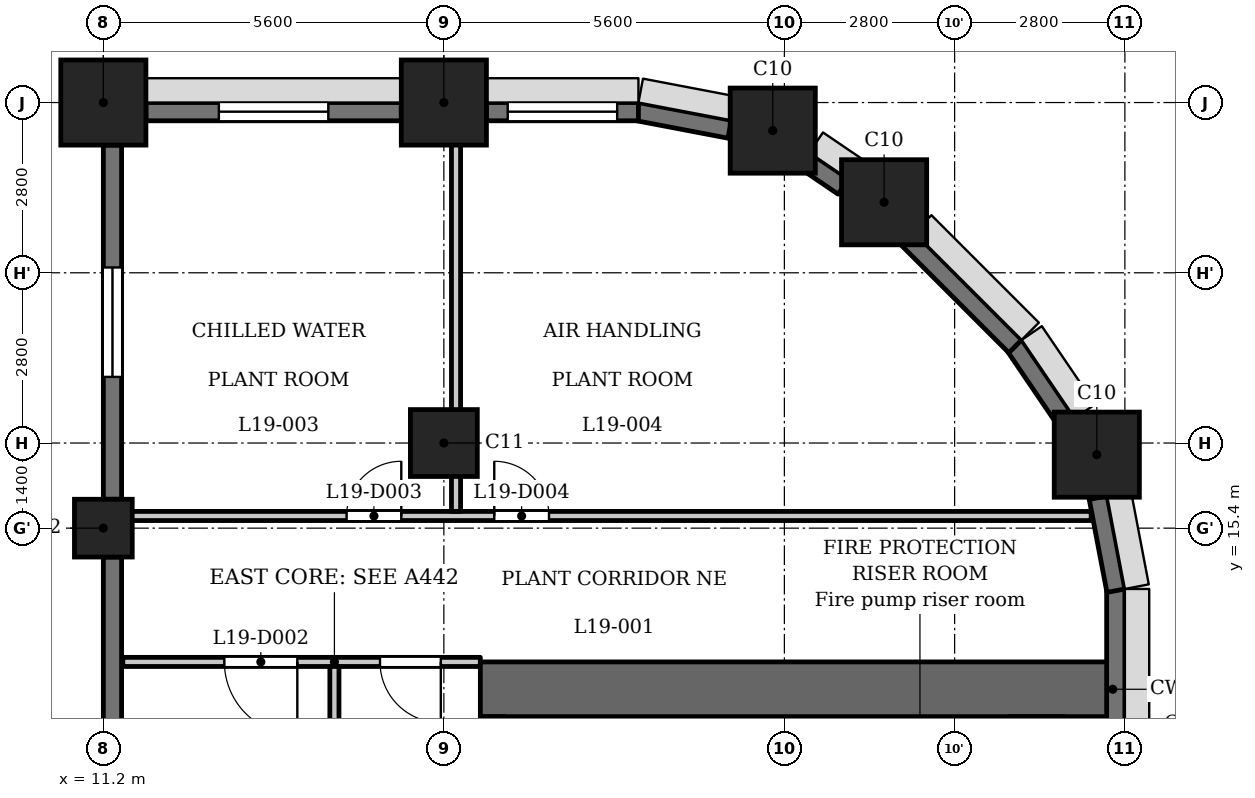
"""IFC4 building model, lengths in metres.
Left out: names, types, materials, properties, quantities, classifications, styles, units other than length and angle.
Written with IfcOpenShell. Run it as: python <this file> out.ifc"""

import sys

from ifc_helpers import new_model, si_unit, direction, frame, frame_2d, origin, origin_2d, place, context, subcontext, project, spatial, rectangle, extrude, element, fill, save


model = new_model("IFC4")
c1 = context("Model", 3, precision=1e-05, world=origin(), true_north=direction((0.0, 1.0)))
c2 = subcontext(c1, "Body", "Model", "MODEL_VIEW")
j1 = project(units=[si_unit("LENGTHUNIT", "METRE"), si_unit("PLANEANGLEUNIT", "RADIAN")], contexts=[c1])
p1 = place(None, origin())
s1 = spatial("IfcSite", under=j1, at=p1, CompositionType="ELEMENT")
p2 = place(p1, origin())
s2 = spatial("IfcBuilding", under=s1, at=p2, CompositionType="ELEMENT")
p3 = place(p2, frame((0.0, 0.0, 77.9)))
s3 = spatial("IfcBuildingStorey", under=s2, at=p3, CompositionType="ELEMENT", Elevation=77.9)
for number, where, z_axis, x_axis in (
    (1, (27.538, 16.609, 0.0), (0.0, 0.0, 1.0), (1.0, 0.0, 0.0)),
    (2, (24.04, 20.76, 0.0), (0.0, 0.0, 1.0), (1.0, 0.0, 0.0)),
    (3, (22.209, 21.938, 0.0), (0.0, 0.0, 1.0), (1.0, 0.0, 0.0)),
    (4, (16.8, 22.4, 0.0), (0.0, 0.0, 1.0), (1.0, 0.0, 0.0)),
    (5, (11.2, 22.4, 0.0), (0.0, 0.0, 1.0), (1.0, 0.0, 0.0)),
):
    element("IfcColumn", number, at=place(p3, frame(where, z_axis=z_axis, x_axis=x_axis)), inside=s3, PredefinedType="COLUMN", context=c2, shape_type="SweptSolid", body=[
        extrude(rectangle(XDim=1.4, YDim=1.4, at=origin_2d()), origin(), (0.0, 0.0, 1.0), 5.4),
    ])
p4 = place(p3, frame((16.8, 16.8, 0.0), z_axis=(0.0, 0.0, 1.0), x_axis=(1.0, 0.0, 0.0)))
e6 = element("IfcColumn", 6, at=p4, inside=s3, PredefinedType="COLUMN", context=c2, shape_type="SweptSolid", body=[
    extrude(rectangle(XDim=1.1, YDim=1.1, at=origin_2d()), origin(), (0.0, 0.0, 1.0), 5.4),
])
p5 = place(p3, frame((11.2, 15.4, 0.0), z_axis=(0.0, 0.0, 1.0), x_axis=(1.0, 0.0, 0.0)))
e7 = element("IfcColumn", 7, at=p5, inside=s3, PredefinedType="COLUMN", context=c2, shape_type="SweptSolid", body=[
    extrude(rectangle(XDim=0.95, YDim=0.95, at=origin_2d()), origin(), (0.0, 0.0, 1.0), 5.4),
])
p6 = place(p3, frame((27.85, 11.9, 0.0), z_axis=(0.0, 0.0, 1.0), x_axis=(0.0, 1.0, 0.0)))
e8 = element("IfcWall", 8, at=p6, inside=s3, PredefinedType="SOLIDWALL", context=c2, shape_type="SweptSolid", body=[
    extrude(rectangle(XDim=2.5, YDim=0.3, at=frame_2d((1.25, 0.0))), origin(), (0.0, 0.0, 1.0), 4.25),
])
for number, where, z_axis, x_axis in (
    (9, (27.853, 14.372, 0.0), (0.0, 0.0, 1.0), (-0.187, 0.982, 0.0)),
    (10, (27.053, 17.126, 0.0), (0.0, 0.0, 1.0), (-0.562, 0.827, 0.0)),
):
    element("IfcWall", number, at=place(p3, frame(where, z_axis=z_axis, x_axis=x_axis)), inside=s3, PredefinedType="SOLIDWALL", context=c2, shape_type="SweptSolid", body=[
        extrude(rectangle(XDim=1.556, YDim=0.3, at=frame_2d((0.778, 0.0))), origin(), (0.0, 0.0, 1.0), 4.25),
    ])
p7 = place(p3, frame((26.197, 18.391, 0.0), z_axis=(0.0, 0.0, 1.0), x_axis=(-0.707057949532, 0.707155609469, 0.0)))
e11 = element("IfcWall", 11, at=p7, inside=s3, PredefinedType="SOLIDWALL", context=c2, shape_type="SweptSolid", body=[
    extrude(rectangle(XDim=2.5, YDim=0.3, at=frame_2d((1.25, 0.0))), origin(), (0.0, 0.0, 1.0), 4.25),
])
p8 = place(p3, frame((23.368, 21.017, 0.0), z_axis=(0.0, 0.0, 1.0), x_axis=(-0.827037530089, 0.562146710232, 0.0)))
e12 = element("IfcWall", 12, at=p8, inside=s3, PredefinedType="SOLIDWALL", context=c2, shape_type="SweptSolid", body=[
    extrude(rectangle(XDim=0.777, YDim=0.3, at=frame_2d((0.388, 0.0))), origin(), (0.0, 0.0, 1.0), 5.1),
])
p9 = place(p3, frame((21.5, 21.961, 0.0), z_axis=(0.0, 0.0, 1.0), x_axis=(-0.982297345734, 0.187328386968, 0.0)))
e13 = element("IfcWall", 13, at=p9, inside=s3, PredefinedType="SOLIDWALL", context=c2, shape_type="SweptSolid", body=[
    extrude(rectangle(XDim=1.556, YDim=0.3, at=frame_2d((0.778, 0.0))), origin(), (0.0, 0.0, 1.0), 4.25),
])
p10 = place(p3, frame((20.0, 22.25, 0.0), z_axis=(0.0, 0.0, 1.0), x_axis=(-1.0, 0.0, 0.0)))
e14 = element("IfcWall", 14, at=p10, inside=s3, PredefinedType="SOLIDWALL", context=c2, shape_type="SweptSolid", body=[
    extrude(rectangle(XDim=2.5, YDim=0.3, at=frame_2d((1.25, 0.0))), origin(), (0.0, 0.0, 1.0), 4.25),
])
p11 = place(p10, frame((0.35, 0.0, 0.9)))
e15 = element("IfcOpeningElement", 15, at=p11, cuts=e14, PredefinedType="OPENING", context=c2, shape_type="SweptSolid", body=[
    extrude(rectangle(XDim=1.8, YDim=1.5, at=frame_2d((0.9, 0.75))), frame((0.0, 0.16, 0.0), z_axis=(0.0, -1.0, 0.0), x_axis=(1.0, 0.0, 0.0)), (0.0, 0.0, 1.0), 0.32),
])
p12 = place(p3, frame((16.1, 22.25, 0.0), z_axis=(0.0, 0.0, 1.0), x_axis=(-1.0, 0.0, 0.0)))
e16 = element("IfcWall", 16, at=p12, inside=s3, PredefinedType="SOLIDWALL", context=c2, shape_type="SweptSolid", body=[
    extrude(rectangle(XDim=4.2, YDim=0.3, at=frame_2d((2.1, 0.0))), origin(), (0.0, 0.0, 1.0), 4.25),
])
p13 = place(p12, frame((1.2, 0.0, 0.9)))
e17 = element("IfcOpeningElement", 17, at=p13, cuts=e16, PredefinedType="OPENING", context=c2, shape_type="SweptSolid", body=[
    extrude(rectangle(XDim=1.8, YDim=1.5, at=frame_2d((0.9, 0.75))), frame((0.0, 0.16, 0.0), z_axis=(0.0, -1.0, 0.0), x_axis=(1.0, 0.0, 0.0)), (0.0, 0.0, 1.0), 0.32),
])
p14 = place(p3, frame((11.35, 21.7, 0.0), z_axis=(0.0, 0.0, 1.0), x_axis=(0.0, -1.0, 0.0)))
e18 = element("IfcWall", 18, at=p14, inside=s3, PredefinedType="SOLIDWALL", context=c2, shape_type="SweptSolid", body=[
    extrude(rectangle(XDim=5.825, YDim=0.3, at=frame_2d((2.913, 0.0))), origin(), (0.0, 0.0, 1.0), 5.1),
])
p15 = place(p14, frame((2.012, 0.0, 0.9)))
e19 = element("IfcOpeningElement", 19, at=p15, cuts=e18, PredefinedType="OPENING", context=c2, shape_type="SweptSolid", body=[
    extrude(rectangle(XDim=1.8, YDim=1.5, at=frame_2d((0.9, 0.75))), frame((0.0, 0.16, 0.0), z_axis=(0.0, -1.0, 0.0), x_axis=(1.0, 0.0, 0.0)), (0.0, 0.0, 1.0), 0.32),
])
p16 = place(p3, frame((11.35, 14.925, 0.0), z_axis=(0.0, 0.0, 1.0), x_axis=(0.0, -1.0, 0.0)))
e20 = element("IfcWall", 20, at=p16, inside=s3, PredefinedType="SOLIDWALL", context=c2, shape_type="SweptSolid", body=[
    extrude(rectangle(XDim=5.975, YDim=0.3, at=frame_2d((2.988, 0.0))), origin(), (0.0, 0.0, 1.0), 5.1),
])
p17 = place(p16, frame((2.988, 0.0, 0.9)))
e21 = element("IfcOpeningElement", 21, at=p17, cuts=e20, PredefinedType="OPENING", context=c2, shape_type="SweptSolid", body=[
    extrude(rectangle(XDim=1.8, YDim=1.5, at=frame_2d((0.9, 0.75))), frame((0.0, 0.16, 0.0), z_axis=(0.0, -1.0, 0.0), x_axis=(1.0, 0.0, 0.0)), (0.0, 0.0, 1.0), 0.32),
])
p18 = place(p3, frame((17.4, 12.75, 0.0), z_axis=(0.0, 0.0, 1.0), x_axis=(1.0, 0.0, 0.0)))
e22 = element("IfcWall", 22, at=p18, inside=s3, PredefinedType="SHEAR", context=c2, shape_type="SweptSolid", body=[
    extrude(rectangle(XDim=10.4, YDim=0.9, at=frame_2d((5.2, 0.0))), origin(), (0.0, 0.0, 1.0), 5.1),
])
p19 = place(p3, frame((17.6, -12.3, 0.0), z_axis=(0.0, 0.0, 1.0), x_axis=(0.0, 1.0, 0.0)))
e23 = element("IfcWall", 23, at=p19, inside=s3, PredefinedType="SHEAR", context=c2, shape_type="SweptSolid", body=[
    extrude(rectangle(XDim=24.6, YDim=0.4, at=frame_2d((12.3, 0.0))), origin(), (0.0, 0.0, 1.0), 5.1),
])
p20 = place(p19, frame((6.0, 0.0, 0.0)))
e24 = element("IfcOpeningElement", 24, at=p20, cuts=e23, PredefinedType="OPENING", context=c2, shape_type="SweptSolid", body=[
    extrude(rectangle(XDim=1.1, YDim=2.1, at=frame_2d((0.55, 1.05))), frame((0.0, 0.21, 0.0), z_axis=(0.0, -1.0, 0.0), x_axis=(1.0, 0.0, 0.0)), (0.0, 0.0, 1.0), 0.42),
])
p21 = place(p19, frame((8.4, 0.0, 0.0)))
e25 = element("IfcOpeningElement", 25, at=p21, cuts=e23, PredefinedType="OPENING", context=c2, shape_type="SweptSolid", body=[
    extrude(rectangle(XDim=1.1, YDim=2.1, at=frame_2d((0.55, 1.05))), frame((0.0, 0.21, 0.0), z_axis=(0.0, -1.0, 0.0), x_axis=(1.0, 0.0, 0.0)), (0.0, 0.0, 1.0), 0.42),
])
p22 = place(p19, frame((10.8, 0.0, 0.0)))
e26 = element("IfcOpeningElement", 26, at=p22, cuts=e23, PredefinedType="OPENING", context=c2, shape_type="SweptSolid", body=[
    extrude(rectangle(XDim=1.1, YDim=2.1, at=frame_2d((0.55, 1.05))), frame((0.0, 0.21, 0.0), z_axis=(0.0, -1.0, 0.0), x_axis=(1.0, 0.0, 0.0)), (0.0, 0.0, 1.0), 0.42),
])
p23 = place(p19, frame((16.75, 0.0, 0.0)))
e27 = element("IfcOpeningElement", 27, at=p23, cuts=e23, PredefinedType="OPENING", context=c2, shape_type="SweptSolid", body=[
    extrude(rectangle(XDim=0.9, YDim=2.1, at=frame_2d((0.45, 1.05))), frame((0.0, 0.21, 0.0), z_axis=(0.0, -1.0, 0.0), x_axis=(1.0, 0.0, 0.0)), (0.0, 0.0, 1.0), 0.42),
])
p24 = place(p19, frame((22.8, 0.0, 0.0)))
e28 = element("IfcOpeningElement", 28, at=p24, cuts=e23, PredefinedType="OPENING", context=c2, shape_type="SweptSolid", body=[
    extrude(rectangle(XDim=1.1, YDim=2.1, at=frame_2d((0.55, 1.05))), frame((0.0, 0.21, 0.0), z_axis=(0.0, -1.0, 0.0), x_axis=(1.0, 0.0, 0.0)), (0.0, 0.0, 1.0), 0.42),
])
p25 = place(p19, frame((0.7, 0.0, 0.0)))
e29 = element("IfcOpeningElement", 29, at=p25, cuts=e23, PredefinedType="OPENING", context=c2, shape_type="SweptSolid", body=[
    extrude(rectangle(XDim=1.1, YDim=2.1, at=frame_2d((0.55, 1.05))), frame((0.0, 0.21, 0.0), z_axis=(0.0, -1.0, 0.0), x_axis=(1.0, 0.0, 0.0)), (0.0, 0.0, 1.0), 0.42),
])
p26 = place(p19, frame((12.775, 0.0, 0.0)))
e30 = element("IfcOpeningElement", 30, at=p26, cuts=e23, PredefinedType="OPENING", context=c2, shape_type="SweptSolid", body=[
    extrude(rectangle(XDim=1.8, YDim=2.1, at=frame_2d((0.9, 1.05))), frame((0.0, 0.21, 0.0), z_axis=(0.0, -1.0, 0.0), x_axis=(1.0, 0.0, 0.0)), (0.0, 0.0, 1.0), 0.42),
])
p27 = place(p3, frame((26.55, -12.3, 0.0), z_axis=(0.0, 0.0, 1.0), x_axis=(0.0, 1.0, 0.0)))
e31 = element("IfcWall", 31, at=p27, inside=s3, PredefinedType="SHEAR", context=c2, shape_type="SweptSolid", body=[
    extrude(rectangle(XDim=24.6, YDim=0.9, at=frame_2d((12.3, 0.0))), origin(), (0.0, 0.0, 1.0), 5.1),
])
p28 = place(p3, frame((23.55, 9.8, 0.0), z_axis=(0.0, 0.0, 1.0), x_axis=(0.0, 1.0, 0.0)))
e32 = element("IfcWall", 32, at=p28, inside=s3, PredefinedType="PARTITIONING", context=c2, shape_type="SweptSolid", body=[
    extrude(rectangle(XDim=2.5, YDim=0.2, at=frame_2d((1.25, 0.0))), origin(), (0.0, 0.0, 1.0), 5.1),
])
p29 = place(p28, frame((0.8, 0.0, 0.0)))
e33 = element("IfcOpeningElement", 33, at=p29, cuts=e32, PredefinedType="OPENING", context=c2, shape_type="SweptSolid", body=[
    extrude(rectangle(XDim=0.9, YDim=2.1, at=frame_2d((0.45, 1.05))), frame((0.0, 0.11, 0.0), z_axis=(0.0, -1.0, 0.0), x_axis=(1.0, 0.0, 0.0)), (0.0, 0.0, 1.0), 0.22),
])
p30 = place(p3, frame((11.52, 13.2, 0.0), z_axis=(0.0, 0.0, 1.0), x_axis=(1.0, 0.0, 0.0)))
e34 = element("IfcWall", 34, at=p30, inside=s3, PredefinedType="PARTITIONING", context=c2, shape_type="SweptSolid", body=[
    extrude(rectangle(XDim=5.88, YDim=0.15, at=frame_2d((2.94, 0.0))), origin(), (0.0, 0.0, 1.0), 5.1),
])
p31 = place(p30, frame((4.23, 0.0, 0.0)))
e35 = element("IfcOpeningElement", 35, at=p31, cuts=e34, PredefinedType="OPENING", context=c2, shape_type="SweptSolid", body=[
    extrude(rectangle(XDim=1.0, YDim=2.1, at=frame_2d((0.5, 1.05))), frame((0.0, 0.085, 0.0), z_axis=(0.0, -1.0, 0.0), x_axis=(1.0, 0.0, 0.0)), (0.0, 0.0, 1.0), 0.17),
])
p32 = place(p30, frame((1.67, 0.0, 0.0)))
e36 = element("IfcOpeningElement", 36, at=p32, cuts=e34, PredefinedType="OPENING", context=c2, shape_type="SweptSolid", body=[
    extrude(rectangle(XDim=1.2, YDim=2.1, at=frame_2d((0.6, 1.05))), frame((0.0, 0.085, 0.0), z_axis=(0.0, -1.0, 0.0), x_axis=(1.0, 0.0, 0.0)), (0.0, 0.0, 1.0), 0.17),
])
p33 = place(p3, frame((11.29, 15.6, 0.0), z_axis=(0.0, 0.0, 1.0), x_axis=(1.0, 0.0, 0.0)))
e37 = element("IfcWall", 37, at=p33, inside=s3, PredefinedType="PARTITIONING", context=c2, shape_type="SweptSolid", body=[
    extrude(rectangle(XDim=16.156, YDim=0.15, at=frame_2d((8.078, 0.0))), origin(), (0.0, 0.0, 1.0), 5.1),
])
p34 = place(p33, frame((3.91, 0.0, 0.0)))
e38 = element("IfcOpeningElement", 38, at=p34, cuts=e37, PredefinedType="OPENING", context=c2, shape_type="SweptSolid", body=[
    extrude(rectangle(XDim=0.9, YDim=2.1, at=frame_2d((0.45, 1.05))), frame((0.0, 0.085, 0.0), z_axis=(0.0, -1.0, 0.0), x_axis=(1.0, 0.0, 0.0)), (0.0, 0.0, 1.0), 0.17),
])
p35 = place(p33, frame((6.339, 0.0, 0.0)))
e39 = element("IfcOpeningElement", 39, at=p35, cuts=e37, PredefinedType="OPENING", context=c2, shape_type="SweptSolid", body=[
    extrude(rectangle(XDim=0.9, YDim=2.1, at=frame_2d((0.45, 1.05))), frame((0.0, 0.085, 0.0), z_axis=(0.0, -1.0, 0.0), x_axis=(1.0, 0.0, 0.0)), (0.0, 0.0, 1.0), 0.17),
])
p36 = place(p3, frame((15.0, 6.769, 0.0), z_axis=(0.0, 0.0, 1.0), x_axis=(0.0, 1.0, 0.0)))
e40 = element("IfcWall", 40, at=p36, inside=s3, PredefinedType="PARTITIONING", context=c2, shape_type="SweptSolid", body=[
    extrude(rectangle(XDim=6.356, YDim=0.15, at=frame_2d((3.178, 0.0))), origin(), (0.0, 0.0, 1.0), 5.1),
])
p37 = place(p3, frame((17.0, 15.675, 0.0), z_axis=(0.0, 0.0, 1.0), x_axis=(0.0, 1.0, 0.0)))
e41 = element("IfcWall", 41, at=p37, inside=s3, PredefinedType="PARTITIONING", context=c2, shape_type="SweptSolid", body=[
    extrude(rectangle(XDim=6.635, YDim=0.15, at=frame_2d((3.317, 0.0))), origin(), (0.0, 0.0, 1.0), 5.1),
])
p38 = place(p31, origin())
e42 = element("IfcDoor", 42, at=p38, inside=s3, OperationType="SINGLE_SWING_RIGHT", PredefinedType="DOOR", context=c2, shape_type="SweptSolid", body=[
    extrude(rectangle(XDim=1.0, YDim=2.1, at=frame_2d((0.5, 1.05))), frame((0.0, 0.025, 0.0), z_axis=(0.0, -1.0, 0.0), x_axis=(1.0, 0.0, 0.0)), (0.0, 0.0, 1.0), 0.05),
])
fill(e35, e42)
p39 = place(p32, origin())
e43 = element("IfcDoor", 43, at=p39, inside=s3, OperationType="SINGLE_SWING_RIGHT", PredefinedType="DOOR", context=c2, shape_type="SweptSolid", body=[
    extrude(rectangle(XDim=1.2, YDim=2.1, at=frame_2d((0.6, 1.05))), frame((0.0, 0.025, 0.0), z_axis=(0.0, -1.0, 0.0), x_axis=(1.0, 0.0, 0.0)), (0.0, 0.0, 1.0), 0.05),
])
fill(e36, e43)
p40 = place(p34, origin())
e44 = element("IfcDoor", 44, at=p40, inside=s3, OperationType="SINGLE_SWING_LEFT", PredefinedType="DOOR", context=c2, shape_type="SweptSolid", body=[
    extrude(rectangle(XDim=0.9, YDim=2.1, at=frame_2d((0.45, 1.05))), frame((0.0, 0.025, 0.0), z_axis=(0.0, -1.0, 0.0), x_axis=(1.0, 0.0, 0.0)), (0.0, 0.0, 1.0), 0.05),
])
fill(e38, e44)
p41 = place(p35, origin())
e45 = element("IfcDoor", 45, at=p41, inside=s3, OperationType="SINGLE_SWING_RIGHT", PredefinedType="DOOR", context=c2, shape_type="SweptSolid", body=[
    extrude(rectangle(XDim=0.9, YDim=2.1, at=frame_2d((0.45, 1.05))), frame((0.0, 0.025, 0.0), z_axis=(0.0, -1.0, 0.0), x_axis=(1.0, 0.0, 0.0)), (0.0, 0.0, 1.0), 0.05),
])
fill(e39, e45)
p42 = place(p11, origin())
e46 = element("IfcWindow", 46, at=p42, inside=s3, PartitioningType="SINGLE_PANEL", PredefinedType="WINDOW", context=c2, shape_type="SweptSolid", body=[
    extrude(rectangle(XDim=1.8, YDim=1.5, at=frame_2d((0.9, 0.75))), frame((0.0, 0.03, 0.0), z_axis=(0.0, -1.0, 0.0), x_axis=(1.0, 0.0, 0.0)), (0.0, 0.0, 1.0), 0.06),
])
fill(e15, e46)
p43 = place(p13, origin())
e47 = element("IfcWindow", 47, at=p43, inside=s3, PartitioningType="SINGLE_PANEL", PredefinedType="WINDOW", context=c2, shape_type="SweptSolid", body=[
    extrude(rectangle(XDim=1.8, YDim=1.5, at=frame_2d((0.9, 0.75))), frame((0.0, 0.03, 0.0), z_axis=(0.0, -1.0, 0.0), x_axis=(1.0, 0.0, 0.0)), (0.0, 0.0, 1.0), 0.06),
])
fill(e17, e47)
p44 = place(p15, origin())
e48 = element("IfcWindow", 48, at=p44, inside=s3, PartitioningType="SINGLE_PANEL", PredefinedType="WINDOW", context=c2, shape_type="SweptSolid", body=[
    extrude(rectangle(XDim=1.8, YDim=1.5, at=frame_2d((0.9, 0.75))), frame((0.0, 0.03, 0.0), z_axis=(0.0, -1.0, 0.0), x_axis=(1.0, 0.0, 0.0)), (0.0, 0.0, 1.0), 0.06),
])
fill(e19, e48)
save(model, sys.argv[1])
